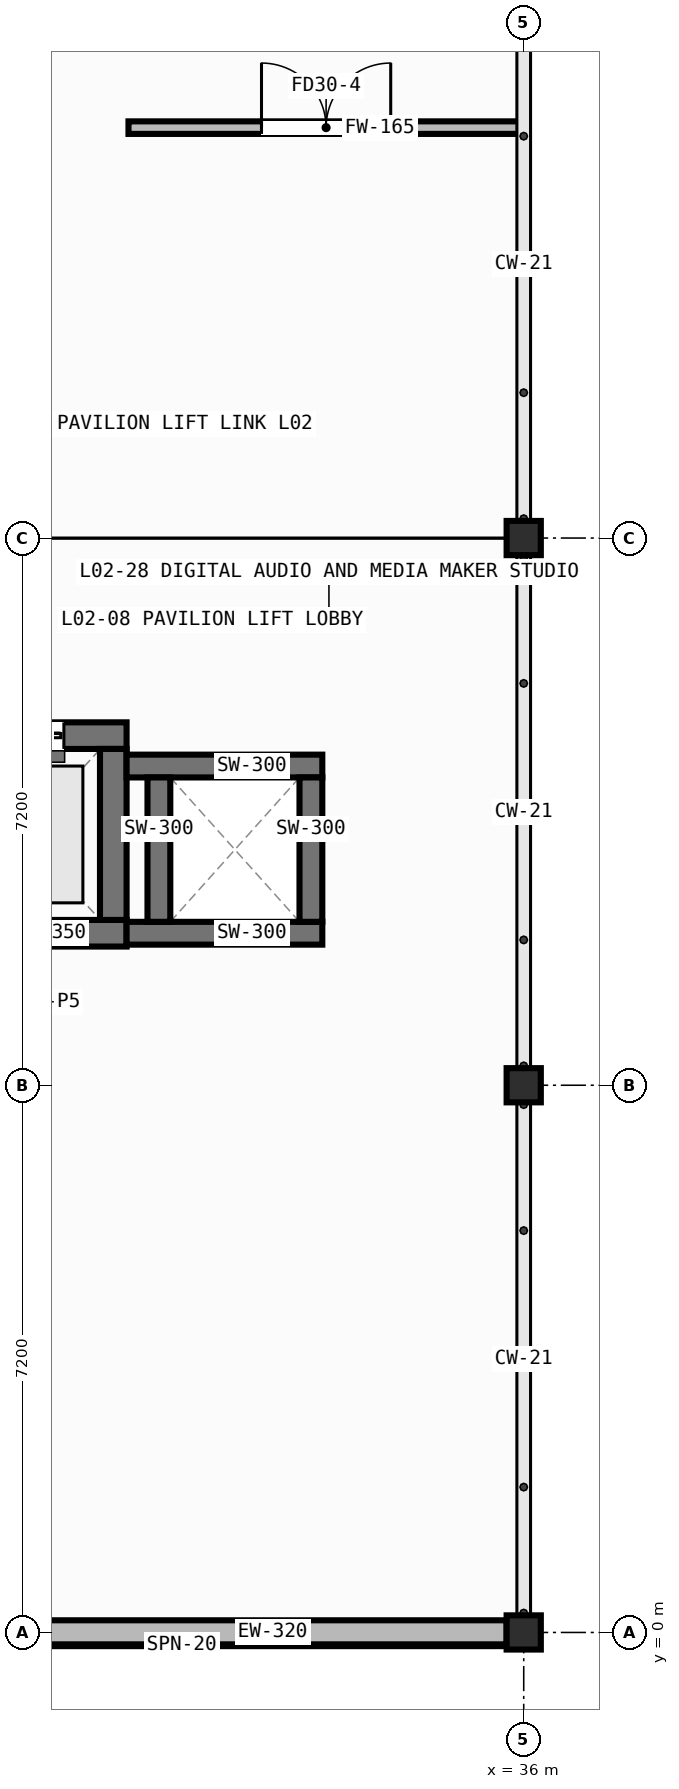
"""IFC4 building model, lengths in metres.
Left out: names, types, materials, properties, quantities, classifications, styles, units other than length and angle.
Written with IfcOpenShell. Run it as: python <this file> out.ifc"""

import sys

from ifc_helpers import new_model, si_unit, direction, frame, frame_2d, origin, origin_2d, place, context, subcontext, project, spatial, rectangle, hollow_rectangle, extrude, element, fill, save


model = new_model("IFC4")
c1 = context("Model", 3, precision=1e-05, world=origin(), true_north=direction((0.0, 1.0)))
c2 = subcontext(c1, "Body", "Model", "MODEL_VIEW")
j1 = project(units=[si_unit("LENGTHUNIT", "METRE"), si_unit("PLANEANGLEUNIT", "RADIAN")], contexts=[c1])
p1 = place(None, origin())
s1 = spatial("IfcSite", under=j1, at=p1, CompositionType="ELEMENT")
p2 = place(p1, origin())
s2 = spatial("IfcBuilding", under=s1, at=p2, CompositionType="ELEMENT")
p3 = place(p2, frame((0.0, 0.0, 4.8)))
s3 = spatial("IfcBuildingStorey", under=s2, at=p3, CompositionType="ELEMENT", Elevation=4.8)
for number, where, z_axis, x_axis in (
    (1, (36.0, 0.0, 0.0), (0.0, 0.0, 1.0), (1.0, 0.0, 0.0)),
    (2, (36.0, 7.2, 0.0), (0.0, 0.0, 1.0), (1.0, 0.0, 0.0)),
    (3, (36.0, 14.4, 0.0), (0.0, 0.0, 1.0), (1.0, 0.0, 0.0)),
):
    element("IfcColumn", number, at=place(p3, frame(where, z_axis=z_axis, x_axis=x_axis)), inside=s3, PredefinedType="COLUMN", context=c2, shape_type="SweptSolid", body=[
        extrude(hollow_rectangle(XDim=0.45, YDim=0.45, WallThickness=0.019, at=origin_2d()), origin(), (0.0, 0.0, 1.0), 4.0),
    ])
p4 = place(p3, frame((27.225, 0.0, 0.0), z_axis=(0.0, 0.0, 1.0), x_axis=(1.0, 0.0, 0.0)))
e4 = element("IfcWall", 4, at=p4, inside=s3, PredefinedType="STANDARD", context=c2, shape_type="SweptSolid", body=[
    extrude(rectangle(XDim=8.55, YDim=0.32, at=frame_2d((4.275, 0.0))), origin(), (0.0, 0.0, 1.0), 3.255),
])
p5 = place(p3, frame((28.025, 9.2, 0.0), z_axis=(0.0, 0.0, 1.0), x_axis=(1.0, 0.0, 0.0)))
e5 = element("IfcWall", 5, at=p5, inside=s3, PredefinedType="SHEAR", context=c2, shape_type="SweptSolid", body=[
    extrude(rectangle(XDim=2.75, YDim=0.35, at=frame_2d((1.375, 0.0))), origin(), (0.0, 0.0, 1.0), 3.755),
])
p6 = place(p3, frame((28.025, 11.8, 0.0), z_axis=(0.0, 0.0, 1.0), x_axis=(1.0, 0.0, 0.0)))
e6 = element("IfcWall", 6, at=p6, inside=s3, PredefinedType="SHEAR", context=c2, shape_type="SweptSolid", body=[
    extrude(rectangle(XDim=2.75, YDim=0.35, at=frame_2d((1.375, 0.0))), origin(), (0.0, 0.0, 1.0), 3.755),
])
p7 = place(p6, frame((0.825, 0.0, 0.0)))
e7 = element("IfcOpeningElement", 7, at=p7, cuts=e6, PredefinedType="OPENING", context=c2, shape_type="SweptSolid", body=[
    extrude(rectangle(XDim=1.1, YDim=2.1, at=frame_2d((0.55, 1.05))), frame((0.0, 0.187, 0.0), z_axis=(0.0, -1.0, 0.0), x_axis=(1.0, 0.0, 0.0)), (0.0, 0.0, 1.0), 0.374),
])
p8 = place(p3, frame((30.6, 9.375, 0.0), z_axis=(0.0, 0.0, 1.0), x_axis=(0.0, 1.0, 0.0)))
e8 = element("IfcWall", 8, at=p8, inside=s3, PredefinedType="SHEAR", context=c2, shape_type="SweptSolid", body=[
    extrude(rectangle(XDim=2.25, YDim=0.35, at=frame_2d((1.125, 0.0))), origin(), (0.0, 0.0, 1.0), 3.755),
])
for number, where, z_axis, x_axis in (
    (9, (30.775, 9.2, 0.0), (0.0, 0.0, 1.0), (1.0, 0.0, 0.0)),
    (10, (30.775, 11.4, 0.0), (0.0, 0.0, 1.0), (1.0, 0.0, 0.0)),
):
    element("IfcWall", number, at=place(p3, frame(where, z_axis=z_axis, x_axis=x_axis)), inside=s3, PredefinedType="SHEAR", context=c2, shape_type="SweptSolid", body=[
        extrude(rectangle(XDim=2.575, YDim=0.3, at=frame_2d((1.288, 0.0))), origin(), (0.0, 0.0, 1.0), 3.755),
    ])
for number, where, z_axis, x_axis in (
    (11, (31.2, 9.35, 0.0), (0.0, 0.0, 1.0), (0.0, 1.0, 0.0)),
    (12, (33.2, 9.35, 0.0), (0.0, 0.0, 1.0), (0.0, 1.0, 0.0)),
):
    element("IfcWall", number, at=place(p3, frame(where, z_axis=z_axis, x_axis=x_axis)), inside=s3, PredefinedType="SHEAR", context=c2, shape_type="SweptSolid", body=[
        extrude(rectangle(XDim=1.9, YDim=0.3, at=frame_2d((0.95, 0.0))), origin(), (0.0, 0.0, 1.0), 3.755),
    ])
p9 = place(p3, frame((30.8, 19.8, 0.0), z_axis=(0.0, 0.0, 1.0), x_axis=(1.0, 0.0, 0.0)))
e13 = element("IfcWall", 13, at=p9, inside=s3, PredefinedType="PARTITIONING", context=c2, shape_type="SweptSolid", body=[
    extrude(rectangle(XDim=5.165, YDim=0.165, at=frame_2d((2.583, 0.0))), origin(), (0.0, 0.0, 1.0), 3.755),
])
p10 = place(p9, frame((1.75, 0.0, 0.0)))
e14 = element("IfcOpeningElement", 14, at=p10, cuts=e13, PredefinedType="OPENING", context=c2, shape_type="SweptSolid", body=[
    extrude(rectangle(XDim=1.7, YDim=2.12, at=frame_2d((0.85, 1.06))), frame((0.0, 0.094, 0.0), z_axis=(0.0, -1.0, 0.0), x_axis=(1.0, 0.0, 0.0)), (0.0, 0.0, 1.0), 0.189),
])
p11 = place(p7, origin())
e15 = element("IfcDoor", 15, at=p11, inside=s3, OperationType="SLIDING_TO_RIGHT", PredefinedType="DOOR", context=c2, shape_type="SweptSolid", body=[
    extrude(rectangle(XDim=1.1, YDim=2.1, at=frame_2d((0.55, 1.05))), frame((0.0, 0.025, 0.0), z_axis=(0.0, -1.0, 0.0), x_axis=(1.0, 0.0, 0.0)), (0.0, 0.0, 1.0), 0.05),
])
fill(e7, e15)
p12 = place(p10, origin())
e16 = element("IfcDoor", 16, at=p12, inside=s3, OperationType="DOUBLE_DOOR_SINGLE_SWING", PredefinedType="DOOR", context=c2, shape_type="SweptSolid", body=[
    extrude(rectangle(XDim=1.7, YDim=2.12, at=frame_2d((0.85, 1.06))), frame((0.0, 0.025, 0.0), z_axis=(0.0, -1.0, 0.0), x_axis=(1.0, 0.0, 0.0)), (0.0, 0.0, 1.0), 0.05),
])
fill(e14, e16)
save(model, sys.argv[1])
